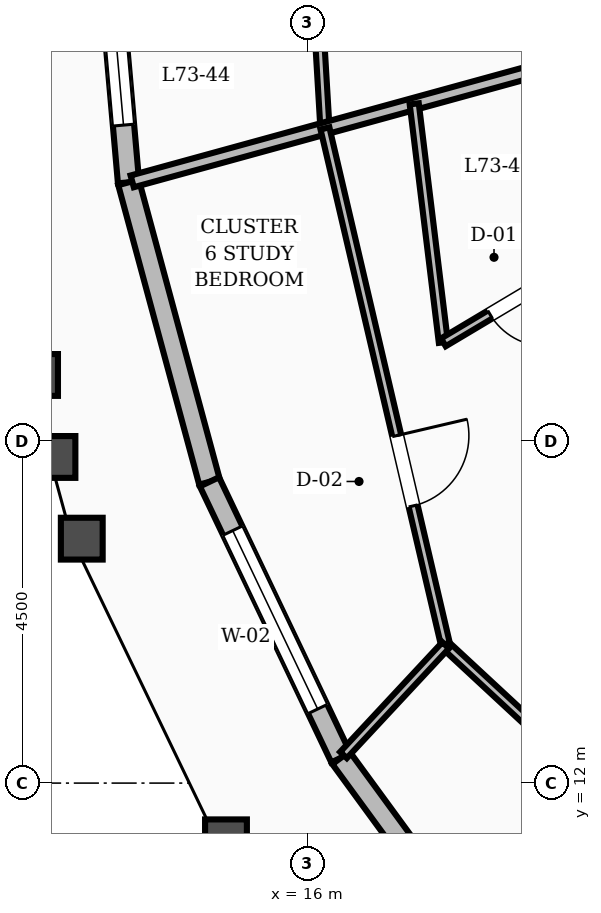
"""IFC4 building model, lengths in metres.
Left out: names, types, materials, properties, quantities, classifications, styles, units other than length and angle.
Written with IfcOpenShell. Run it as: python <this file> out.ifc"""

import sys

from ifc_helpers import new_model, si_unit, direction, frame, frame_2d, origin, place, context, subcontext, project, spatial, rectangle, extrude, element, fill, save


model = new_model("IFC4")
c1 = context("Model", 3, precision=1e-05, world=origin(), true_north=direction((0.0, 1.0)))
c2 = subcontext(c1, "Body", "Model", "MODEL_VIEW")
j1 = project(units=[si_unit("LENGTHUNIT", "METRE"), si_unit("PLANEANGLEUNIT", "RADIAN")], contexts=[c1])
p1 = place(None, origin())
s1 = spatial("IfcSite", under=j1, at=p1, CompositionType="ELEMENT")
p2 = place(p1, origin())
s2 = spatial("IfcBuilding", under=s1, at=p2, CompositionType="ELEMENT")
p3 = place(p2, frame((0.0, 0.0, 279.6)))
s3 = spatial("IfcBuildingStorey", under=s2, at=p3, CompositionType="ELEMENT", Elevation=279.6)
p4 = place(p3, frame((13.287, 24.0, 0.0), z_axis=(0.0, 0.0, 1.0), x_axis=(0.087441623723, -0.996169645412, 0.0)))
e1 = element("IfcWall", 1, at=p4, inside=s3, PredefinedType="STANDARD", context=c2, shape_type="SweptSolid", body=[
    extrude(rectangle(XDim=4.113, YDim=0.28, at=frame_2d((2.056, 0.0))), origin(), (0.0, 0.0, 1.0), 2.88),
])
p5 = place(p4, frame((0.756, 0.0, 0.8)))
e2 = element("IfcOpeningElement", 2, at=p5, cuts=e1, PredefinedType="OPENING", context=c2, shape_type="SweptSolid", body=[
    extrude(rectangle(XDim=2.6, YDim=1.65, at=frame_2d((1.3, 0.825))), frame((0.0, 0.15, 0.0), z_axis=(0.0, -1.0, 0.0), x_axis=(1.0, 0.0, 0.0)), (0.0, 0.0, 1.0), 0.3),
])
p6 = place(p3, frame((13.647, 19.903, 0.0), z_axis=(0.0, 0.0, 1.0), x_axis=(0.260889436927, -0.965368686927, 0.0)))
e3 = element("IfcWall", 3, at=p6, inside=s3, PredefinedType="STANDARD", context=c2, shape_type="SweptSolid", body=[
    extrude(rectangle(XDim=4.081, YDim=0.28, at=frame_2d((2.041, 0.0))), origin(), (0.0, 0.0, 1.0), 2.88),
])
p7 = place(p3, frame((14.712, 15.963, 0.0), z_axis=(0.0, 0.0, 1.0), x_axis=(0.430011346388, -0.902823483289, 0.0)))
e4 = element("IfcWall", 4, at=p7, inside=s3, PredefinedType="STANDARD", context=c2, shape_type="SweptSolid", body=[
    extrude(rectangle(XDim=4.021, YDim=0.28, at=frame_2d((2.011, 0.0))), origin(), (0.0, 0.0, 1.0), 2.88),
])
p8 = place(p7, frame((0.711, 0.0, 0.8)))
e5 = element("IfcOpeningElement", 5, at=p8, cuts=e4, PredefinedType="OPENING", context=c2, shape_type="SweptSolid", body=[
    extrude(rectangle(XDim=2.6, YDim=1.65, at=frame_2d((1.3, 0.825))), frame((0.0, 0.15, 0.0), z_axis=(0.0, -1.0, 0.0), x_axis=(1.0, 0.0, 0.0)), (0.0, 0.0, 1.0), 0.3),
])
p9 = place(p3, frame((16.441, 12.333, 0.0), z_axis=(0.0, 0.0, 1.0), x_axis=(0.590275846693, -0.807201601095, 0.0)))
e6 = element("IfcWall", 6, at=p9, inside=s3, PredefinedType="STANDARD", context=c2, shape_type="SweptSolid", body=[
    extrude(rectangle(XDim=3.942, YDim=0.28, at=frame_2d((1.971, 0.0))), origin(), (0.0, 0.0, 1.0), 2.88),
])
p10 = place(p3, frame((16.03, 24.0, 0.0), z_axis=(0.0, 0.0, 1.0), x_axis=(0.059367421014, -0.998236199164, 0.0)))
e7 = element("IfcWall", 7, at=p10, inside=s3, PredefinedType="PARTITIONING", context=c2, shape_type="SweptSolid", body=[
    extrude(rectangle(XDim=3.393, YDim=0.12, at=frame_2d((1.696, 0.0))), origin(), (0.0, 0.0, 1.0), 2.87),
])
p11 = place(p10, frame((1.221, 0.0, 0.0)))
e8 = element("IfcOpeningElement", 8, at=p11, cuts=e7, PredefinedType="OPENING", context=c2, shape_type="SweptSolid", body=[
    extrude(rectangle(XDim=0.95, YDim=2.1, at=frame_2d((0.475, 1.05))), frame((0.0, 0.07, 0.0), z_axis=(0.0, -1.0, 0.0), x_axis=(1.0, 0.0, 0.0)), (0.0, 0.0, 1.0), 0.14),
])
p12 = place(p3, frame((19.52, 21.518, 0.0), z_axis=(0.0, 0.0, 1.0), x_axis=(-0.964228378678, -0.265072883849, 0.0)))
e9 = element("IfcWall", 9, at=p12, inside=s3, PredefinedType="SOLIDWALL", context=c2, shape_type="SweptSolid", body=[
    extrude(rectangle(XDim=6.041, YDim=0.16, at=frame_2d((3.021, 0.0))), origin(), (0.0, 0.0, 1.0), 2.87),
])
p13 = place(p3, frame((17.406, 20.936, 0.0), z_axis=(0.0, 0.0, 1.0), x_axis=(0.121249255799, -0.992622092222, 0.0)))
e10 = element("IfcWall", 10, at=p13, inside=s3, PredefinedType="PARTITIONING", context=c2, shape_type="SweptSolid", body=[
    extrude(rectangle(XDim=3.161, YDim=0.12, at=frame_2d((1.581, 0.0))), origin(), (0.0, 0.0, 1.0), 2.87),
])
p14 = place(p3, frame((19.52, 18.831, 0.0), z_axis=(0.0, 0.0, 1.0), x_axis=(-0.858879340115, -0.512177976023, 0.0)))
e11 = element("IfcWall", 11, at=p14, inside=s3, PredefinedType="PARTITIONING", context=c2, shape_type="SweptSolid", body=[
    extrude(rectangle(XDim=2.015, YDim=0.12, at=frame_2d((1.008, 0.0))), origin(), (0.0, 0.0, 1.0), 2.87),
])
p15 = place(p14, frame((0.44, 0.0, 0.0)))
e12 = element("IfcOpeningElement", 12, at=p15, cuts=e11, PredefinedType="OPENING", context=c2, shape_type="SweptSolid", body=[
    extrude(rectangle(XDim=0.86, YDim=2.1, at=frame_2d((0.43, 1.05))), frame((0.0, 0.07, 0.0), z_axis=(0.0, -1.0, 0.0), x_axis=(1.0, 0.0, 0.0)), (0.0, 0.0, 1.0), 0.14),
])
p16 = place(p3, frame((16.231, 20.613, 0.0), z_axis=(0.0, 0.0, 1.0), x_axis=(0.22738655048, -0.973804578271, 0.0)))
e13 = element("IfcWall", 13, at=p16, inside=s3, PredefinedType="PARTITIONING", context=c2, shape_type="SweptSolid", body=[
    extrude(rectangle(XDim=6.983, YDim=0.12, at=frame_2d((3.492, 0.0))), origin(), (0.0, 0.0, 1.0), 2.87),
])
p17 = place(p16, frame((4.15, 0.0, 0.0)))
e14 = element("IfcOpeningElement", 14, at=p17, cuts=e13, PredefinedType="OPENING", context=c2, shape_type="SweptSolid", body=[
    extrude(rectangle(XDim=0.95, YDim=2.1, at=frame_2d((0.475, 1.05))), frame((0.0, 0.07, 0.0), z_axis=(0.0, -1.0, 0.0), x_axis=(1.0, 0.0, 0.0)), (0.0, 0.0, 1.0), 0.14),
])
p18 = place(p3, frame((17.819, 13.813, 0.0), z_axis=(0.0, 0.0, 1.0), x_axis=(0.733297734746, -0.679907664479, 0.0)))
e15 = element("IfcWall", 15, at=p18, inside=s3, PredefinedType="PARTITIONING", context=c2, shape_type="SweptSolid", body=[
    extrude(rectangle(XDim=6.809, YDim=0.12, at=frame_2d((3.404, 0.0))), origin(), (0.0, 0.0, 1.0), 2.87),
])
p19 = place(p18, frame((2.929, 0.0, 0.0)))
e16 = element("IfcOpeningElement", 16, at=p19, cuts=e15, PredefinedType="OPENING", context=c2, shape_type="SweptSolid", body=[
    extrude(rectangle(XDim=0.95, YDim=2.1, at=frame_2d((0.475, 1.05))), frame((0.0, 0.07, 0.0), z_axis=(0.0, -1.0, 0.0), x_axis=(1.0, 0.0, 0.0)), (0.0, 0.0, 1.0), 0.14),
])
p20 = place(p3, frame((17.819, 13.813, 0.0), z_axis=(0.0, 0.0, 1.0), x_axis=(-0.681404809589, -0.73190674643, 0.0)))
e17 = element("IfcWall", 17, at=p20, inside=s3, PredefinedType="PARTITIONING", context=c2, shape_type="SweptSolid", body=[
    extrude(rectangle(XDim=1.972, YDim=0.12, at=frame_2d((0.986, 0.0))), origin(), (0.0, 0.0, 1.0), 2.87),
])
p21 = place(p5, origin())
e18 = element("IfcWindow", 18, at=p21, inside=s3, PartitioningType="SINGLE_PANEL", PredefinedType="WINDOW", context=c2, shape_type="SweptSolid", body=[
    extrude(rectangle(XDim=2.6, YDim=1.65, at=frame_2d((1.3, 0.825))), frame((0.0, 0.03, 0.0), z_axis=(0.0, -1.0, 0.0), x_axis=(1.0, 0.0, 0.0)), (0.0, 0.0, 1.0), 0.06),
])
fill(e2, e18)
p22 = place(p8, origin())
e19 = element("IfcWindow", 19, at=p22, inside=s3, PartitioningType="SINGLE_PANEL", PredefinedType="WINDOW", context=c2, shape_type="SweptSolid", body=[
    extrude(rectangle(XDim=2.6, YDim=1.65, at=frame_2d((1.3, 0.825))), frame((0.0, 0.03, 0.0), z_axis=(0.0, -1.0, 0.0), x_axis=(1.0, 0.0, 0.0)), (0.0, 0.0, 1.0), 0.06),
])
fill(e5, e19)
p23 = place(p15, origin())
e20 = element("IfcDoor", 20, at=p23, inside=s3, OperationType="SINGLE_SWING_LEFT", PredefinedType="DOOR", context=c2, shape_type="SweptSolid", body=[
    extrude(rectangle(XDim=0.86, YDim=2.1, at=frame_2d((0.43, 1.05))), frame((0.0, 0.025, 0.0), z_axis=(0.0, -1.0, 0.0), x_axis=(1.0, 0.0, 0.0)), (0.0, 0.0, 1.0), 0.05),
])
fill(e12, e20)
p24 = place(p17, origin())
e21 = element("IfcDoor", 21, at=p24, inside=s3, OperationType="SINGLE_SWING_LEFT", PredefinedType="DOOR", context=c2, shape_type="SweptSolid", body=[
    extrude(rectangle(XDim=0.95, YDim=2.1, at=frame_2d((0.475, 1.05))), frame((0.0, 0.025, 0.0), z_axis=(0.0, -1.0, 0.0), x_axis=(1.0, 0.0, 0.0)), (0.0, 0.0, 1.0), 0.05),
])
fill(e14, e21)
save(model, sys.argv[1])
